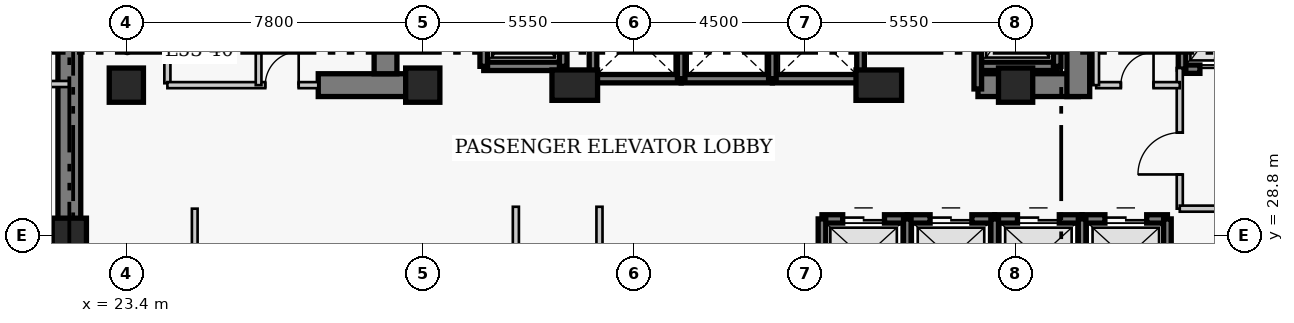
"""IFC4 building model, lengths in metres.
Left out: names, types, materials, properties, quantities, classifications, styles, units other than length and angle.
Written with IfcOpenShell. Run it as: python <this file> out.ifc"""

import sys

from ifc_helpers import new_model, si_unit, direction, frame, frame_2d, origin, origin_2d, place, context, subcontext, project, spatial, rectangle, extrude, element, fill, save


model = new_model("IFC4")
c1 = context("Model", 3, precision=1e-05, world=origin(), true_north=direction((0.0, 1.0)))
c2 = subcontext(c1, "Body", "Model", "MODEL_VIEW")
j1 = project(units=[si_unit("LENGTHUNIT", "METRE"), si_unit("PLANEANGLEUNIT", "RADIAN")], contexts=[c1])
p1 = place(None, origin())
s1 = spatial("IfcSite", under=j1, at=p1, CompositionType="ELEMENT")
p2 = place(p1, origin())
s2 = spatial("IfcBuilding", under=s1, at=p2, CompositionType="ELEMENT")
p3 = place(p2, frame((0.0, 0.0, 212.4)))
s3 = spatial("IfcBuildingStorey", under=s2, at=p3, CompositionType="ELEMENT", Elevation=212.4)
p4 = place(p3, frame((21.9, 27.05, 0.0), z_axis=(0.0, 0.0, 1.0), x_axis=(0.0, 1.0, 0.0)))
e1 = element("IfcWall", 1, at=p4, inside=s3, PredefinedType="SHEAR", context=c2, shape_type="SweptSolid", body=[
    extrude(rectangle(XDim=13.57, YDim=0.6, at=frame_2d((6.785, 0.0))), origin(), (0.0, 0.0, 1.0), 3.9),
])
p5 = place(p3, frame((28.45, 32.75, 0.0), z_axis=(0.0, 0.0, 1.0), x_axis=(1.0, 0.0, 0.0)))
e2 = element("IfcWall", 2, at=p5, inside=s3, PredefinedType="SHEAR", context=c2, shape_type="SweptSolid", body=[
    extrude(rectangle(XDim=2.4, YDim=0.6, at=frame_2d((1.2, 0.0))), origin(), (0.0, 0.0, 1.0), 3.9),
])
p6 = place(p3, frame((45.81, 32.75, 0.0), z_axis=(0.0, 0.0, 1.0), x_axis=(1.0, 0.0, 0.0)))
e3 = element("IfcWall", 3, at=p6, inside=s3, PredefinedType="SHEAR", context=c2, shape_type="SweptSolid", body=[
    extrude(rectangle(XDim=2.64, YDim=0.6, at=frame_2d((1.32, 0.0))), origin(), (0.0, 0.0, 1.0), 3.9),
])
p7 = place(p3, frame((30.22, 33.05, 0.0), z_axis=(0.0, 0.0, 1.0), x_axis=(0.0, 1.0, 0.0)))
e4 = element("IfcWall", 4, at=p7, inside=s3, PredefinedType="SHEAR", context=c2, shape_type="SweptSolid", body=[
    extrude(rectangle(XDim=7.27, YDim=0.6, at=frame_2d((3.635, 0.0))), origin(), (0.0, 0.0, 1.0), 3.9),
])
p8 = place(p3, frame((48.45, 32.45, 0.0), z_axis=(0.0, 0.0, 1.0), x_axis=(0.0, 1.0, 0.0)))
e5 = element("IfcWall", 5, at=p8, inside=s3, PredefinedType="SHEAR", context=c2, shape_type="SweptSolid", body=[
    extrude(rectangle(XDim=7.87, YDim=0.6, at=frame_2d((3.935, 0.0))), origin(), (0.0, 0.0, 1.0), 3.9),
])
p9 = place(p8, frame((5.75, 0.0, 0.0)))
e6 = element("IfcOpeningElement", 6, at=p9, cuts=e5, PredefinedType="OPENING", context=c2, shape_type="SweptSolid", body=[
    extrude(rectangle(XDim=1.1, YDim=2.15, at=frame_2d((0.55, 1.075))), frame((0.0, 0.31, 0.0), z_axis=(0.0, -1.0, 0.0), x_axis=(1.0, 0.0, 0.0)), (0.0, 0.0, 1.0), 0.62),
])
for number, where, z_axis, x_axis in (
    (7, (21.9, 28.8, 0.0), (0.0, 0.0, 1.0), (1.0, 0.0, 0.0)),
    (8, (23.4, 32.75, 0.0), (0.0, 0.0, 1.0), (1.0, 0.0, 0.0)),
    (9, (31.2, 32.75, 0.0), (0.0, 0.0, 1.0), (1.0, 0.0, 0.0)),
):
    element("IfcColumn", number, at=place(p3, frame(where, z_axis=z_axis, x_axis=x_axis)), inside=s3, PredefinedType="COLUMN", context=c2, shape_type="SweptSolid", body=[
        extrude(rectangle(XDim=0.9, YDim=0.9, at=origin_2d()), origin(), (0.0, 0.0, 1.0), 3.9),
    ])
for number, where, z_axis, x_axis in (
    (10, (35.2, 32.75, 0.0), (0.0, 0.0, 1.0), (1.0, 0.0, 0.0)),
    (11, (43.2, 32.75, 0.0), (0.0, 0.0, 1.0), (1.0, 0.0, 0.0)),
):
    element("IfcColumn", number, at=place(p3, frame(where, z_axis=z_axis, x_axis=x_axis)), inside=s3, PredefinedType="COLUMN", context=c2, shape_type="SweptSolid", body=[
        extrude(rectangle(XDim=1.2, YDim=0.8, at=origin_2d()), origin(), (0.0, 0.0, 1.0), 3.9),
    ])
p10 = place(p3, frame((46.8, 32.75, 0.0), z_axis=(0.0, 0.0, 1.0), x_axis=(1.0, 0.0, 0.0)))
e12 = element("IfcColumn", 12, at=p10, inside=s3, PredefinedType="COLUMN", context=c2, shape_type="SweptSolid", body=[
    extrude(rectangle(XDim=0.9, YDim=0.9, at=origin_2d()), origin(), (0.0, 0.0, 1.0), 3.9),
])
p11 = place(p3, frame((41.705, 29.23, 0.0), z_axis=(0.0, 0.0, 1.0), x_axis=(1.0, 0.0, 0.0)))
e13 = element("IfcWall", 13, at=p11, inside=s3, PredefinedType="SHEAR", context=c2, shape_type="SweptSolid", body=[
    extrude(rectangle(XDim=2.245, YDim=0.22, at=frame_2d((1.123, 0.0))), origin(), (0.0, 0.0, 1.0), 3.9),
])
p12 = place(p11, frame((0.545, 0.0, 0.0)))
e14 = element("IfcOpeningElement", 14, at=p12, cuts=e13, PredefinedType="OPENING", context=c2, shape_type="SweptSolid", body=[
    extrude(rectangle(XDim=1.1, YDim=2.15, at=frame_2d((0.55, 1.075))), frame((0.0, 0.12, 0.0), z_axis=(0.0, -1.0, 0.0), x_axis=(1.0, 0.0, 0.0)), (0.0, 0.0, 1.0), 0.24),
])
p13 = place(p3, frame((41.705, 27.17, 0.0), z_axis=(0.0, 0.0, 1.0), x_axis=(0.0, 1.0, 0.0)))
e15 = element("IfcWall", 15, at=p13, inside=s3, PredefinedType="SHEAR", context=c2, shape_type="SweptSolid", body=[
    extrude(rectangle(XDim=2.06, YDim=0.2, at=frame_2d((1.03, 0.0))), origin(), (0.0, 0.0, 1.0), 3.9),
])
p14 = place(p3, frame((43.95, 29.23, 0.0), z_axis=(0.0, 0.0, 1.0), x_axis=(1.0, 0.0, 0.0)))
e16 = element("IfcWall", 16, at=p14, inside=s3, PredefinedType="SHEAR", context=c2, shape_type="SweptSolid", body=[
    extrude(rectangle(XDim=2.3, YDim=0.22, at=frame_2d((1.15, 0.0))), origin(), (0.0, 0.0, 1.0), 3.9),
])
p15 = place(p14, frame((0.6, 0.0, 0.0)))
e17 = element("IfcOpeningElement", 17, at=p15, cuts=e16, PredefinedType="OPENING", context=c2, shape_type="SweptSolid", body=[
    extrude(rectangle(XDim=1.1, YDim=2.15, at=frame_2d((0.55, 1.075))), frame((0.0, 0.12, 0.0), z_axis=(0.0, -1.0, 0.0), x_axis=(1.0, 0.0, 0.0)), (0.0, 0.0, 1.0), 0.24),
])
p16 = place(p3, frame((43.95, 27.17, 0.0), z_axis=(0.0, 0.0, 1.0), x_axis=(0.0, 1.0, 0.0)))
e18 = element("IfcWall", 18, at=p16, inside=s3, PredefinedType="SHEAR", context=c2, shape_type="SweptSolid", body=[
    extrude(rectangle(XDim=2.06, YDim=0.2, at=frame_2d((1.03, 0.0))), origin(), (0.0, 0.0, 1.0), 3.9),
])
p17 = place(p3, frame((46.25, 29.23, 0.0), z_axis=(0.0, 0.0, 1.0), x_axis=(1.0, 0.0, 0.0)))
e19 = element("IfcWall", 19, at=p17, inside=s3, PredefinedType="SHEAR", context=c2, shape_type="SweptSolid", body=[
    extrude(rectangle(XDim=2.3, YDim=0.22, at=frame_2d((1.15, 0.0))), origin(), (0.0, 0.0, 1.0), 3.9),
])
p18 = place(p17, frame((0.6, 0.0, 0.0)))
e20 = element("IfcOpeningElement", 20, at=p18, cuts=e19, PredefinedType="OPENING", context=c2, shape_type="SweptSolid", body=[
    extrude(rectangle(XDim=1.1, YDim=2.15, at=frame_2d((0.55, 1.075))), frame((0.0, 0.12, 0.0), z_axis=(0.0, -1.0, 0.0), x_axis=(1.0, 0.0, 0.0)), (0.0, 0.0, 1.0), 0.24),
])
p19 = place(p3, frame((46.25, 27.17, 0.0), z_axis=(0.0, 0.0, 1.0), x_axis=(0.0, 1.0, 0.0)))
e21 = element("IfcWall", 21, at=p19, inside=s3, PredefinedType="SHEAR", context=c2, shape_type="SweptSolid", body=[
    extrude(rectangle(XDim=2.06, YDim=0.2, at=frame_2d((1.03, 0.0))), origin(), (0.0, 0.0, 1.0), 3.9),
])
p20 = place(p3, frame((48.55, 29.23, 0.0), z_axis=(0.0, 0.0, 1.0), x_axis=(1.0, 0.0, 0.0)))
e22 = element("IfcWall", 22, at=p20, inside=s3, PredefinedType="SHEAR", context=c2, shape_type="SweptSolid", body=[
    extrude(rectangle(XDim=2.245, YDim=0.22, at=frame_2d((1.123, 0.0))), origin(), (0.0, 0.0, 1.0), 3.9),
])
p21 = place(p20, frame((0.6, 0.0, 0.0)))
e23 = element("IfcOpeningElement", 23, at=p21, cuts=e22, PredefinedType="OPENING", context=c2, shape_type="SweptSolid", body=[
    extrude(rectangle(XDim=1.1, YDim=2.15, at=frame_2d((0.55, 1.075))), frame((0.0, 0.12, 0.0), z_axis=(0.0, -1.0, 0.0), x_axis=(1.0, 0.0, 0.0)), (0.0, 0.0, 1.0), 0.24),
])
for number, where, z_axis, x_axis in (
    (24, (48.55, 27.17, 0.0), (0.0, 0.0, 1.0), (0.0, 1.0, 0.0)),
    (25, (50.795, 27.17, 0.0), (0.0, 0.0, 1.0), (0.0, 1.0, 0.0)),
):
    element("IfcWall", number, at=place(p3, frame(where, z_axis=z_axis, x_axis=x_axis)), inside=s3, PredefinedType="SHEAR", context=c2, shape_type="SweptSolid", body=[
        extrude(rectangle(XDim=2.06, YDim=0.2, at=frame_2d((1.03, 0.0))), origin(), (0.0, 0.0, 1.0), 3.9),
    ])
p22 = place(p3, frame((35.68, 32.92, 0.0), z_axis=(0.0, 0.0, 1.0), x_axis=(1.0, 0.0, 0.0)))
e26 = element("IfcWall", 26, at=p22, inside=s3, PredefinedType="SHEAR", context=c2, shape_type="SweptSolid", body=[
    extrude(rectangle(XDim=2.32, YDim=0.22, at=frame_2d((1.16, 0.0))), origin(), (0.0, 0.0, 1.0), 3.9),
])
p23 = place(p3, frame((35.68, 32.92, 0.0), z_axis=(0.0, 0.0, 1.0), x_axis=(0.0, 1.0, 0.0)))
e27 = element("IfcWall", 27, at=p23, inside=s3, PredefinedType="SHEAR", context=c2, shape_type="SweptSolid", body=[
    extrude(rectangle(XDim=2.16, YDim=0.2, at=frame_2d((1.08, 0.0))), origin(), (0.0, 0.0, 1.0), 3.9),
])
p24 = place(p3, frame((38.0, 32.92, 0.0), z_axis=(0.0, 0.0, 1.0), x_axis=(1.0, 0.0, 0.0)))
e28 = element("IfcWall", 28, at=p24, inside=s3, PredefinedType="SHEAR", context=c2, shape_type="SweptSolid", body=[
    extrude(rectangle(XDim=2.4, YDim=0.22, at=frame_2d((1.2, 0.0))), origin(), (0.0, 0.0, 1.0), 3.9),
])
p25 = place(p3, frame((38.0, 32.92, 0.0), z_axis=(0.0, 0.0, 1.0), x_axis=(0.0, 1.0, 0.0)))
e29 = element("IfcWall", 29, at=p25, inside=s3, PredefinedType="SHEAR", context=c2, shape_type="SweptSolid", body=[
    extrude(rectangle(XDim=2.16, YDim=0.2, at=frame_2d((1.08, 0.0))), origin(), (0.0, 0.0, 1.0), 3.9),
])
p26 = place(p3, frame((40.4, 32.92, 0.0), z_axis=(0.0, 0.0, 1.0), x_axis=(1.0, 0.0, 0.0)))
e30 = element("IfcWall", 30, at=p26, inside=s3, PredefinedType="SHEAR", context=c2, shape_type="SweptSolid", body=[
    extrude(rectangle(XDim=2.32, YDim=0.22, at=frame_2d((1.16, 0.0))), origin(), (0.0, 0.0, 1.0), 3.9),
])
for number, where, z_axis, x_axis in (
    (31, (40.4, 32.92, 0.0), (0.0, 0.0, 1.0), (0.0, 1.0, 0.0)),
    (32, (42.72, 32.92, 0.0), (0.0, 0.0, 1.0), (0.0, 1.0, 0.0)),
):
    element("IfcWall", number, at=place(p3, frame(where, z_axis=z_axis, x_axis=x_axis)), inside=s3, PredefinedType="SHEAR", context=c2, shape_type="SweptSolid", body=[
        extrude(rectangle(XDim=2.16, YDim=0.2, at=frame_2d((1.08, 0.0))), origin(), (0.0, 0.0, 1.0), 3.9),
    ])
p27 = place(p3, frame((51.18, 33.17, 0.0), z_axis=(0.0, 0.0, 1.0), x_axis=(1.0, 0.0, 0.0)))
e33 = element("IfcWall", 33, at=p27, inside=s3, PredefinedType="SHEAR", context=c2, shape_type="SweptSolid", body=[
    extrude(rectangle(XDim=2.42, YDim=0.22, at=frame_2d((1.21, 0.0))), origin(), (0.0, 0.0, 1.0), 3.9),
])
p28 = place(p27, frame((0.47, 0.0, 0.0)))
e34 = element("IfcOpeningElement", 34, at=p28, cuts=e33, PredefinedType="OPENING", context=c2, shape_type="SweptSolid", body=[
    extrude(rectangle(XDim=1.3, YDim=2.15, at=frame_2d((0.65, 1.075))), frame((0.0, 0.12, 0.0), z_axis=(0.0, -1.0, 0.0), x_axis=(1.0, 0.0, 0.0)), (0.0, 0.0, 1.0), 0.24),
])
p29 = place(p3, frame((51.18, 33.17, 0.0), z_axis=(0.0, 0.0, 1.0), x_axis=(0.0, 1.0, 0.0)))
e35 = element("IfcWall", 35, at=p29, inside=s3, PredefinedType="SHEAR", context=c2, shape_type="SweptSolid", body=[
    extrude(rectangle(XDim=2.86, YDim=0.2, at=frame_2d((1.43, 0.0))), origin(), (0.0, 0.0, 1.0), 3.9),
])
p30 = place(p3, frame((32.805, 33.245, 0.0), z_axis=(0.0, 0.0, 1.0), x_axis=(1.0, 0.0, 0.0)))
e36 = element("IfcWall", 36, at=p30, inside=s3, PredefinedType="SHEAR", context=c2, shape_type="SweptSolid", body=[
    extrude(rectangle(XDim=2.09, YDim=0.22, at=frame_2d((1.045, 0.0))), origin(), (0.0, 0.0, 1.0), 3.9),
])
for number, where, z_axis, x_axis in (
    (37, (32.805, 33.245, 0.0), (0.0, 0.0, 1.0), (0.0, 1.0, 0.0)),
    (38, (34.895, 33.245, 0.0), (0.0, 0.0, 1.0), (0.0, 1.0, 0.0)),
):
    element("IfcWall", number, at=place(p3, frame(where, z_axis=z_axis, x_axis=x_axis)), inside=s3, PredefinedType="SHEAR", context=c2, shape_type="SweptSolid", body=[
        extrude(rectangle(XDim=2.91, YDim=0.2, at=frame_2d((1.455, 0.0))), origin(), (0.0, 0.0, 1.0), 3.9),
    ])
p31 = place(p3, frame((45.805, 33.245, 0.0), z_axis=(0.0, 0.0, 1.0), x_axis=(1.0, 0.0, 0.0)))
e39 = element("IfcWall", 39, at=p31, inside=s3, PredefinedType="SHEAR", context=c2, shape_type="SweptSolid", body=[
    extrude(rectangle(XDim=2.09, YDim=0.22, at=frame_2d((1.045, 0.0))), origin(), (0.0, 0.0, 1.0), 3.9),
])
p32 = place(p3, frame((45.805, 32.65, 0.0), z_axis=(0.0, 0.0, 1.0), x_axis=(0.0, 1.0, 0.0)))
e40 = element("IfcWall", 40, at=p32, inside=s3, PredefinedType="SHEAR", context=c2, shape_type="SweptSolid", body=[
    extrude(rectangle(XDim=3.505, YDim=0.2, at=frame_2d((1.752, 0.0))), origin(), (0.0, 0.0, 1.0), 3.9),
])
p33 = place(p3, frame((47.895, 33.245, 0.0), z_axis=(0.0, 0.0, 1.0), x_axis=(0.0, 1.0, 0.0)))
e41 = element("IfcWall", 41, at=p33, inside=s3, PredefinedType="SHEAR", context=c2, shape_type="SweptSolid", body=[
    extrude(rectangle(XDim=2.91, YDim=0.2, at=frame_2d((1.455, 0.0))), origin(), (0.0, 0.0, 1.0), 3.9),
])
p34 = place(p3, frame((24.48, 32.8, 0.0), z_axis=(0.0, 0.0, 1.0), x_axis=(0.0, 1.0, 0.0)))
e42 = element("IfcWall", 42, at=p34, inside=s3, PredefinedType="PARTITIONING", context=c2, shape_type="SweptSolid", body=[
    extrude(rectangle(XDim=3.57, YDim=0.16, at=frame_2d((1.785, 0.0))), origin(), (0.0, 0.0, 1.0), 3.65),
])
p35 = place(p34, frame((1.604, 0.0, 0.0)))
e43 = element("IfcOpeningElement", 43, at=p35, cuts=e42, PredefinedType="OPENING", context=c2, shape_type="SweptSolid", body=[
    extrude(rectangle(XDim=0.9, YDim=2.1, at=frame_2d((0.45, 1.05))), frame((0.0, 0.09, 0.0), z_axis=(0.0, -1.0, 0.0), x_axis=(1.0, 0.0, 0.0)), (0.0, 0.0, 1.0), 0.18),
])
p36 = place(p3, frame((51.12, 29.5, 0.0), z_axis=(0.0, 0.0, 1.0), x_axis=(0.0, 1.0, 0.0)))
e44 = element("IfcWall", 44, at=p36, inside=s3, PredefinedType="PARTITIONING", context=c2, shape_type="SweptSolid", body=[
    extrude(rectangle(XDim=3.7, YDim=0.16, at=frame_2d((1.85, 0.0))), origin(), (0.0, 0.0, 1.0), 3.65),
])
p37 = place(p36, frame((0.9, 0.0, 0.0)))
e45 = element("IfcOpeningElement", 45, at=p37, cuts=e44, PredefinedType="OPENING", context=c2, shape_type="SweptSolid", body=[
    extrude(rectangle(XDim=1.1, YDim=2.15, at=frame_2d((0.55, 1.075))), frame((0.0, 0.09, 0.0), z_axis=(0.0, -1.0, 0.0), x_axis=(1.0, 0.0, 0.0)), (0.0, 0.0, 1.0), 0.18),
])
p38 = place(p3, frame((51.12, 29.5, 0.0), z_axis=(0.0, 0.0, 1.0), x_axis=(1.0, 0.0, 0.0)))
e46 = element("IfcWall", 46, at=p38, inside=s3, PredefinedType="PARTITIONING", context=c2, shape_type="SweptSolid", body=[
    extrude(rectangle(XDim=5.63, YDim=0.16, at=frame_2d((2.815, 0.0))), origin(), (0.0, 0.0, 1.0), 3.65),
])
p39 = place(p3, frame((24.48, 32.75, 0.0), z_axis=(0.0, 0.0, 1.0), x_axis=(1.0, 0.0, 0.0)))
e47 = element("IfcWall", 47, at=p39, inside=s3, PredefinedType="PARTITIONING", context=c2, shape_type="SweptSolid", body=[
    extrude(rectangle(XDim=3.97, YDim=0.16, at=frame_2d((1.985, 0.0))), origin(), (0.0, 0.0, 1.0), 3.65),
])
p40 = place(p39, frame((2.575, 0.0, 0.0)))
e48 = element("IfcOpeningElement", 48, at=p40, cuts=e47, PredefinedType="OPENING", context=c2, shape_type="SweptSolid", body=[
    extrude(rectangle(XDim=0.88, YDim=2.05, at=frame_2d((0.44, 1.025))), frame((0.0, 0.09, 0.0), z_axis=(0.0, -1.0, 0.0), x_axis=(1.0, 0.0, 0.0)), (0.0, 0.0, 1.0), 0.18),
])
p41 = place(p3, frame((48.92, 32.75, 0.0), z_axis=(0.0, 0.0, 1.0), x_axis=(1.0, 0.0, 0.0)))
e49 = element("IfcWall", 49, at=p41, inside=s3, PredefinedType="PARTITIONING", context=c2, shape_type="SweptSolid", body=[
    extrude(rectangle(XDim=2.2, YDim=0.16, at=frame_2d((1.1, 0.0))), origin(), (0.0, 0.0, 1.0), 3.65),
])
p42 = place(p41, frame((0.65, 0.0, 0.0)))
e50 = element("IfcOpeningElement", 50, at=p42, cuts=e49, PredefinedType="OPENING", context=c2, shape_type="SweptSolid", body=[
    extrude(rectangle(XDim=0.86, YDim=2.05, at=frame_2d((0.43, 1.025))), frame((0.0, 0.09, 0.0), z_axis=(0.0, -1.0, 0.0), x_axis=(1.0, 0.0, 0.0)), (0.0, 0.0, 1.0), 0.18),
])
for number, where, z_axis, x_axis in (
    (51, (48.92, 32.75, 0.0), (0.0, 0.0, 1.0), (0.0, 1.0, 0.0)),
    (52, (26.88, 32.75, 0.0), (0.0, 0.0, 1.0), (0.0, 1.0, 0.0)),
):
    element("IfcWall", number, at=place(p3, frame(where, z_axis=z_axis, x_axis=x_axis)), inside=s3, PredefinedType="PARTITIONING", context=c2, shape_type="SweptSolid", body=[
        extrude(rectangle(XDim=3.62, YDim=0.15, at=frame_2d((1.81, 0.0))), origin(), (0.0, 0.0, 1.0), 3.65),
    ])
for number, where, z_axis, x_axis in (
    (53, (33.65, 16.86, 0.0), (0.0, 0.0, 1.0), (0.0, 1.0, 0.0)),
    (54, (35.85, 16.86, 0.0), (0.0, 0.0, 1.0), (0.0, 1.0, 0.0)),
):
    element("IfcWall", number, at=place(p3, frame(where, z_axis=z_axis, x_axis=x_axis)), inside=s3, PredefinedType="PARTITIONING", context=c2, shape_type="SweptSolid", body=[
        extrude(rectangle(XDim=12.69, YDim=0.16, at=frame_2d((6.345, 0.0))), origin(), (0.0, 0.0, 1.0), 3.65),
    ])
p43 = place(p3, frame((18.86, 32.78, 0.0), z_axis=(0.0, 0.0, 1.0), x_axis=(1.0, 0.0, 0.0)))
e55 = element("IfcWall", 55, at=p43, inside=s3, PredefinedType="PARTITIONING", context=c2, shape_type="SweptSolid", body=[
    extrude(rectangle(XDim=3.04, YDim=0.16, at=frame_2d((1.52, 0.0))), origin(), (0.0, 0.0, 1.0), 3.65),
])
p44 = place(p3, frame((25.2, 16.86, 0.0), z_axis=(0.0, 0.0, 1.0), x_axis=(0.0, 1.0, 0.0)))
e56 = element("IfcWall", 56, at=p44, inside=s3, PredefinedType="PARTITIONING", context=c2, shape_type="SweptSolid", body=[
    extrude(rectangle(XDim=12.64, YDim=0.15, at=frame_2d((6.32, 0.0))), origin(), (0.0, 0.0, 1.0), 3.65),
])
p45 = place(p12, origin())
e57 = element("IfcDoor", 57, at=p45, inside=s3, OperationType="DOUBLE_DOOR_SLIDING", PredefinedType="DOOR", context=c2, shape_type="SweptSolid", body=[
    extrude(rectangle(XDim=1.1, YDim=2.15, at=frame_2d((0.55, 1.075))), frame((0.0, 0.025, 0.0), z_axis=(0.0, -1.0, 0.0), x_axis=(1.0, 0.0, 0.0)), (0.0, 0.0, 1.0), 0.05),
])
fill(e14, e57)
p46 = place(p15, origin())
e58 = element("IfcDoor", 58, at=p46, inside=s3, OperationType="DOUBLE_DOOR_SLIDING", PredefinedType="DOOR", context=c2, shape_type="SweptSolid", body=[
    extrude(rectangle(XDim=1.1, YDim=2.15, at=frame_2d((0.55, 1.075))), frame((0.0, 0.025, 0.0), z_axis=(0.0, -1.0, 0.0), x_axis=(1.0, 0.0, 0.0)), (0.0, 0.0, 1.0), 0.05),
])
fill(e17, e58)
p47 = place(p18, origin())
e59 = element("IfcDoor", 59, at=p47, inside=s3, OperationType="DOUBLE_DOOR_SLIDING", PredefinedType="DOOR", context=c2, shape_type="SweptSolid", body=[
    extrude(rectangle(XDim=1.1, YDim=2.15, at=frame_2d((0.55, 1.075))), frame((0.0, 0.025, 0.0), z_axis=(0.0, -1.0, 0.0), x_axis=(1.0, 0.0, 0.0)), (0.0, 0.0, 1.0), 0.05),
])
fill(e20, e59)
p48 = place(p21, origin())
e60 = element("IfcDoor", 60, at=p48, inside=s3, OperationType="DOUBLE_DOOR_SLIDING", PredefinedType="DOOR", context=c2, shape_type="SweptSolid", body=[
    extrude(rectangle(XDim=1.1, YDim=2.15, at=frame_2d((0.55, 1.075))), frame((0.0, 0.025, 0.0), z_axis=(0.0, -1.0, 0.0), x_axis=(1.0, 0.0, 0.0)), (0.0, 0.0, 1.0), 0.05),
])
fill(e23, e60)
p49 = place(p28, origin())
e61 = element("IfcDoor", 61, at=p49, inside=s3, OperationType="DOUBLE_DOOR_SLIDING", PredefinedType="DOOR", context=c2, shape_type="SweptSolid", body=[
    extrude(rectangle(XDim=1.3, YDim=2.15, at=frame_2d((0.65, 1.075))), frame((0.0, 0.025, 0.0), z_axis=(0.0, -1.0, 0.0), x_axis=(1.0, 0.0, 0.0)), (0.0, 0.0, 1.0), 0.05),
])
fill(e34, e61)
p50 = place(p37, origin())
e62 = element("IfcDoor", 62, at=p50, inside=s3, OperationType="SINGLE_SWING_LEFT", PredefinedType="DOOR", context=c2, shape_type="SweptSolid", body=[
    extrude(rectangle(XDim=1.1, YDim=2.15, at=frame_2d((0.55, 1.075))), frame((0.0, 0.025, 0.0), z_axis=(0.0, -1.0, 0.0), x_axis=(1.0, 0.0, 0.0)), (0.0, 0.0, 1.0), 0.05),
])
fill(e45, e62)
p51 = place(p40, origin())
e63 = element("IfcDoor", 63, at=p51, inside=s3, OperationType="SINGLE_SWING_RIGHT", PredefinedType="DOOR", context=c2, shape_type="SweptSolid", body=[
    extrude(rectangle(XDim=0.88, YDim=2.05, at=frame_2d((0.44, 1.025))), frame((0.0, 0.025, 0.0), z_axis=(0.0, -1.0, 0.0), x_axis=(1.0, 0.0, 0.0)), (0.0, 0.0, 1.0), 0.05),
])
fill(e48, e63)
p52 = place(p42, origin())
e64 = element("IfcDoor", 64, at=p52, inside=s3, OperationType="SINGLE_SWING_RIGHT", PredefinedType="DOOR", context=c2, shape_type="SweptSolid", body=[
    extrude(rectangle(XDim=0.86, YDim=2.05, at=frame_2d((0.43, 1.025))), frame((0.0, 0.025, 0.0), z_axis=(0.0, -1.0, 0.0), x_axis=(1.0, 0.0, 0.0)), (0.0, 0.0, 1.0), 0.05),
])
fill(e50, e64)
save(model, sys.argv[1])
